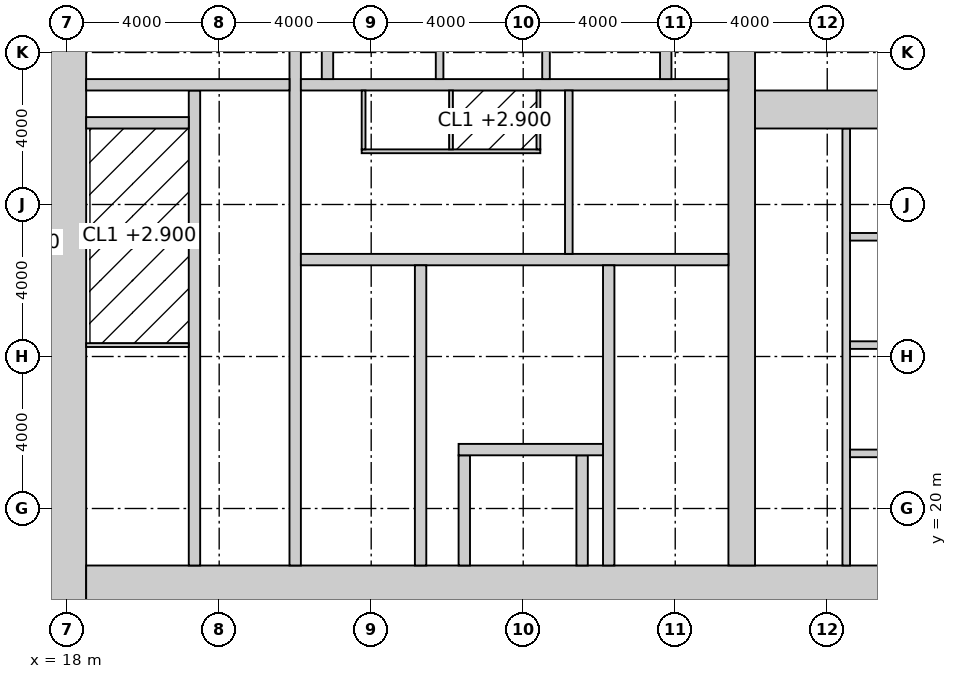
"""IFC4 building model, lengths in metres.
Left out: names, types, materials, properties, quantities, classifications, styles, units other than length and angle.
Written with IfcOpenShell. Run it as: python <this file> out.ifc"""

import sys

from ifc_helpers import new_model, si_unit, direction, frame, frame_2d, origin, place, context, subcontext, project, spatial, rectangle, extrude, element, fill, save


model = new_model("IFC4")
c1 = context("Model", 3, precision=1e-05, world=origin(), true_north=direction((0.0, 1.0)))
c2 = subcontext(c1, "Body", "Model", "MODEL_VIEW")
j1 = project(units=[si_unit("LENGTHUNIT", "METRE"), si_unit("PLANEANGLEUNIT", "RADIAN")], contexts=[c1])
p1 = place(None, origin())
s1 = spatial("IfcSite", under=j1, at=p1, CompositionType="ELEMENT")
p2 = place(p1, origin())
s2 = spatial("IfcBuilding", under=s1, at=p2, CompositionType="ELEMENT")
p3 = place(p2, frame((0.0, 0.0, 27.0)))
s3 = spatial("IfcBuildingStorey", under=s2, at=p3, CompositionType="ELEMENT", Elevation=27.0)
p4 = place(p3, frame((18.0, 17.1, -0.15), z_axis=(0.0, 0.0, 1.0), x_axis=(0.0, 1.0, 0.0)))
e1 = element("IfcWall", 1, at=p4, inside=s3, PredefinedType="SHEAR", context=c2, shape_type="SweptSolid", body=[
    extrude(rectangle(XDim=19.8, YDim=1.0, at=frame_2d((9.9, 0.0))), origin(), (0.0, 0.0, 1.0), 4.0),
])
p5 = place(p3, frame((18.5, 17.8, -0.15), z_axis=(0.0, 0.0, 1.0), x_axis=(1.0, 0.0, 0.0)))
e2 = element("IfcWall", 2, at=p5, inside=s3, PredefinedType="SHEAR", context=c2, shape_type="SweptSolid", body=[
    extrude(rectangle(XDim=23.0, YDim=1.4, at=frame_2d((11.5, 0.0))), origin(), (0.0, 0.0, 1.0), 4.0),
])
p6 = place(p5, frame((3.45, 0.0, 0.15)))
e3 = element("IfcOpeningElement", 3, at=p6, cuts=e2, PredefinedType="OPENING", context=c2, shape_type="SweptSolid", body=[
    extrude(rectangle(XDim=1.5, YDim=2.4, at=frame_2d((0.75, 1.2))), frame((0.0, 0.71, 0.0), z_axis=(0.0, -1.0, 0.0), x_axis=(1.0, 0.0, 0.0)), (0.0, 0.0, 1.0), 1.42),
])
p7 = place(p5, frame((17.9, 0.0, 0.15)))
e4 = element("IfcOpeningElement", 4, at=p7, cuts=e2, PredefinedType="OPENING", context=c2, shape_type="SweptSolid", body=[
    extrude(rectangle(XDim=1.5, YDim=2.4, at=frame_2d((0.75, 1.2))), frame((0.0, 0.71, 0.0), z_axis=(0.0, -1.0, 0.0), x_axis=(1.0, 0.0, 0.0)), (0.0, 0.0, 1.0), 1.42),
])
p8 = place(p5, frame((0.9, 0.0, 0.15)))
e5 = element("IfcOpeningElement", 5, at=p8, cuts=e2, PredefinedType="OPENING", context=c2, shape_type="SweptSolid", body=[
    extrude(rectangle(XDim=1.0, YDim=2.2, at=frame_2d((0.5, 1.1))), frame((0.0, 0.71, 0.0), z_axis=(0.0, -1.0, 0.0), x_axis=(1.0, 0.0, 0.0)), (0.0, 0.0, 1.0), 1.42),
])
p9 = place(p3, frame((35.75, 18.5, -0.15), z_axis=(0.0, 0.0, 1.0), x_axis=(0.0, 1.0, 0.0)))
e6 = element("IfcWall", 6, at=p9, inside=s3, PredefinedType="SHEAR", context=c2, shape_type="SweptSolid", body=[
    extrude(rectangle(XDim=17.0, YDim=0.7, at=frame_2d((8.5, 0.0))), origin(), (0.0, 0.0, 1.0), 4.0),
])
p10 = place(p9, frame((9.85, 0.0, 0.15)))
e7 = element("IfcOpeningElement", 7, at=p10, cuts=e6, PredefinedType="OPENING", context=c2, shape_type="SweptSolid", body=[
    extrude(rectangle(XDim=1.0, YDim=2.2, at=frame_2d((0.5, 1.1))), frame((0.0, 0.36, 0.0), z_axis=(0.0, -1.0, 0.0), x_axis=(1.0, 0.0, 0.0)), (0.0, 0.0, 1.0), 0.72),
])
p11 = place(p3, frame((24.0, 18.5, -0.15), z_axis=(0.0, 0.0, 1.0), x_axis=(0.0, 1.0, 0.0)))
e8 = element("IfcWall", 8, at=p11, inside=s3, PredefinedType="SHEAR", context=c2, shape_type="SweptSolid", body=[
    extrude(rectangle(XDim=17.0, YDim=0.3, at=frame_2d((8.5, 0.0))), origin(), (0.0, 0.0, 1.0), 4.0),
])
p12 = place(p11, frame((9.6, 0.0, 0.15)))
e9 = element("IfcOpeningElement", 9, at=p12, cuts=e8, PredefinedType="OPENING", context=c2, shape_type="SweptSolid", body=[
    extrude(rectangle(XDim=1.5, YDim=2.4, at=frame_2d((0.75, 1.2))), frame((0.0, 0.16, 0.0), z_axis=(0.0, -1.0, 0.0), x_axis=(1.0, 0.0, 0.0)), (0.0, 0.0, 1.0), 0.32),
])
p13 = place(p3, frame((24.15, 26.55, -0.15), z_axis=(0.0, 0.0, 1.0), x_axis=(1.0, 0.0, 0.0)))
e10 = element("IfcWall", 10, at=p13, inside=s3, PredefinedType="SHEAR", context=c2, shape_type="SweptSolid", body=[
    extrude(rectangle(XDim=11.25, YDim=0.3, at=frame_2d((5.625, 0.0))), origin(), (0.0, 0.0, 1.0), 4.0),
])
p14 = place(p13, frame((9.25, 0.0, 0.15)))
e11 = element("IfcOpeningElement", 11, at=p14, cuts=e10, PredefinedType="OPENING", context=c2, shape_type="SweptSolid", body=[
    extrude(rectangle(XDim=1.0, YDim=2.2, at=frame_2d((0.5, 1.1))), frame((0.0, 0.16, 0.0), z_axis=(0.0, -1.0, 0.0), x_axis=(1.0, 0.0, 0.0)), (0.0, 0.0, 1.0), 0.32),
])
p15 = place(p13, frame((4.9, 0.0, 0.15)))
e12 = element("IfcOpeningElement", 12, at=p15, cuts=e10, PredefinedType="OPENING", context=c2, shape_type="SweptSolid", body=[
    extrude(rectangle(XDim=1.5, YDim=2.4, at=frame_2d((0.75, 1.2))), frame((0.0, 0.16, 0.0), z_axis=(0.0, -1.0, 0.0), x_axis=(1.0, 0.0, 0.0)), (0.0, 0.0, 1.0), 0.32),
])
p16 = place(p3, frame((27.3, 18.5, -0.15), z_axis=(0.0, 0.0, 1.0), x_axis=(0.0, 1.0, 0.0)))
e13 = element("IfcWall", 13, at=p16, inside=s3, PredefinedType="SHEAR", context=c2, shape_type="SweptSolid", body=[
    extrude(rectangle(XDim=7.9, YDim=0.3, at=frame_2d((3.95, 0.0))), origin(), (0.0, 0.0, 1.0), 4.0),
])
p17 = place(p16, frame((6.4, 0.0, 0.15)))
e14 = element("IfcOpeningElement", 14, at=p17, cuts=e13, PredefinedType="OPENING", context=c2, shape_type="SweptSolid", body=[
    extrude(rectangle(XDim=1.0, YDim=2.2, at=frame_2d((0.5, 1.1))), frame((0.0, 0.16, 0.0), z_axis=(0.0, -1.0, 0.0), x_axis=(1.0, 0.0, 0.0)), (0.0, 0.0, 1.0), 0.32),
])
p18 = place(p3, frame((32.25, 18.5, -0.15), z_axis=(0.0, 0.0, 1.0), x_axis=(0.0, 1.0, 0.0)))
e15 = element("IfcWall", 15, at=p18, inside=s3, PredefinedType="SHEAR", context=c2, shape_type="SweptSolid", body=[
    extrude(rectangle(XDim=7.9, YDim=0.3, at=frame_2d((3.95, 0.0))), origin(), (0.0, 0.0, 1.0), 4.0),
])
for number, where, z_axis, x_axis in (
    (16, (28.45, 18.5, -0.15), (0.0, 0.0, 1.0), (0.0, 1.0, 0.0)),
    (17, (31.55, 18.5, -0.15), (0.0, 0.0, 1.0), (0.0, 1.0, 0.0)),
):
    element("IfcWall", number, at=place(p3, frame(where, z_axis=z_axis, x_axis=x_axis)), inside=s3, PredefinedType="SHEAR", context=c2, shape_type="SweptSolid", body=[
        extrude(rectangle(XDim=2.9, YDim=0.3, at=frame_2d((1.45, 0.0))), origin(), (0.0, 0.0, 1.0), 4.0),
    ])
p19 = place(p3, frame((28.3, 21.55, -0.15), z_axis=(0.0, 0.0, 1.0), x_axis=(1.0, 0.0, 0.0)))
e18 = element("IfcWall", 18, at=p19, inside=s3, PredefinedType="SHEAR", context=c2, shape_type="SweptSolid", body=[
    extrude(rectangle(XDim=3.8, YDim=0.3, at=frame_2d((1.9, 0.0))), origin(), (0.0, 0.0, 1.0), 4.0),
])
p20 = place(p19, frame((1.05, 0.0, 0.15)))
e19 = element("IfcOpeningElement", 19, at=p20, cuts=e18, PredefinedType="OPENING", context=c2, shape_type="SweptSolid", body=[
    extrude(rectangle(XDim=1.3, YDim=2.4, at=frame_2d((0.65, 1.2))), frame((0.0, 0.16, 0.0), z_axis=(0.0, -1.0, 0.0), x_axis=(1.0, 0.0, 0.0)), (0.0, 0.0, 1.0), 0.32),
])
p21 = place(p3, frame((24.15, 31.15, -0.15), z_axis=(0.0, 0.0, 1.0), x_axis=(1.0, 0.0, 0.0)))
e20 = element("IfcWall", 20, at=p21, inside=s3, PredefinedType="SHEAR", context=c2, shape_type="SweptSolid", body=[
    extrude(rectangle(XDim=11.25, YDim=0.3, at=frame_2d((5.625, 0.0))), origin(), (0.0, 0.0, 1.0), 4.0),
])
p22 = place(p21, frame((7.25, 0.0, 0.15)))
e21 = element("IfcOpeningElement", 21, at=p22, cuts=e20, PredefinedType="OPENING", context=c2, shape_type="SweptSolid", body=[
    extrude(rectangle(XDim=1.4, YDim=2.4, at=frame_2d((0.7, 1.2))), frame((0.0, 0.16, 0.0), z_axis=(0.0, -1.0, 0.0), x_axis=(1.0, 0.0, 0.0)), (0.0, 0.0, 1.0), 0.32),
])
p23 = place(p3, frame((21.35, 18.5, -0.15), z_axis=(0.0, 0.0, 1.0), x_axis=(0.0, 1.0, 0.0)))
e22 = element("IfcWall", 22, at=p23, inside=s3, PredefinedType="SHEAR", context=c2, shape_type="SweptSolid", body=[
    extrude(rectangle(XDim=12.5, YDim=0.3, at=frame_2d((6.25, 0.0))), origin(), (0.0, 0.0, 1.0), 4.0),
])
p24 = place(p23, frame((8.15, 0.0, 0.15)))
e23 = element("IfcOpeningElement", 23, at=p24, cuts=e22, PredefinedType="OPENING", context=c2, shape_type="SweptSolid", body=[
    extrude(rectangle(XDim=1.0, YDim=2.2, at=frame_2d((0.5, 1.1))), frame((0.0, 0.16, 0.0), z_axis=(0.0, -1.0, 0.0), x_axis=(1.0, 0.0, 0.0)), (0.0, 0.0, 1.0), 0.32),
])
p25 = place(p3, frame((18.5, 31.15, -0.15), z_axis=(0.0, 0.0, 1.0), x_axis=(1.0, 0.0, 0.0)))
e24 = element("IfcWall", 24, at=p25, inside=s3, PredefinedType="SHEAR", context=c2, shape_type="SweptSolid", body=[
    extrude(rectangle(XDim=5.35, YDim=0.3, at=frame_2d((2.675, 0.0))), origin(), (0.0, 0.0, 1.0), 4.0),
])
p26 = place(p25, frame((3.4, 0.0, 0.15)))
e25 = element("IfcOpeningElement", 25, at=p26, cuts=e24, PredefinedType="OPENING", context=c2, shape_type="SweptSolid", body=[
    extrude(rectangle(XDim=1.0, YDim=2.2, at=frame_2d((0.5, 1.1))), frame((0.0, 0.16, 0.0), z_axis=(0.0, -1.0, 0.0), x_axis=(1.0, 0.0, 0.0)), (0.0, 0.0, 1.0), 0.32),
])
p27 = place(p3, frame((18.5, 30.15, -0.15), z_axis=(0.0, 0.0, 1.0), x_axis=(1.0, 0.0, 0.0)))
e26 = element("IfcWall", 26, at=p27, inside=s3, PredefinedType="SHEAR", context=c2, shape_type="SweptSolid", body=[
    extrude(rectangle(XDim=2.7, YDim=0.3, at=frame_2d((1.35, 0.0))), origin(), (0.0, 0.0, 1.0), 4.0),
])
for number, where, z_axis, x_axis in (
    (27, (24.85, 31.3, -0.15), (0.0, 0.0, 1.0), (0.0, 1.0, 0.0)),
    (28, (33.75, 31.3, -0.15), (0.0, 0.0, 1.0), (0.0, 1.0, 0.0)),
):
    element("IfcWall", number, at=place(p3, frame(where, z_axis=z_axis, x_axis=x_axis)), inside=s3, PredefinedType="SHEAR", context=c2, shape_type="SweptSolid", body=[
        extrude(rectangle(XDim=4.2, YDim=0.3, at=frame_2d((2.1, 0.0))), origin(), (0.0, 0.0, 1.0), 4.0),
    ])
for number, where, z_axis, x_axis in (
    (29, (27.8, 31.3, -0.15), (0.0, 0.0, 1.0), (0.0, 1.0, 0.0)),
    (30, (30.6, 31.3, -0.15), (0.0, 0.0, 1.0), (0.0, 1.0, 0.0)),
):
    element("IfcWall", number, at=place(p3, frame(where, z_axis=z_axis, x_axis=x_axis)), inside=s3, PredefinedType="SOLIDWALL", context=c2, shape_type="SweptSolid", body=[
        extrude(rectangle(XDim=2.8, YDim=0.2, at=frame_2d((1.4, 0.0))), origin(), (0.0, 0.0, 1.0), 4.0),
    ])
p28 = place(p3, frame((38.5, 18.5, -0.15), z_axis=(0.0, 0.0, 1.0), x_axis=(0.0, 1.0, 0.0)))
e31 = element("IfcWall", 31, at=p28, inside=s3, PredefinedType="SOLIDWALL", context=c2, shape_type="SweptSolid", body=[
    extrude(rectangle(XDim=11.5, YDim=0.2, at=frame_2d((5.75, 0.0))), origin(), (0.0, 0.0, 1.0), 4.0),
])
p29 = place(p28, frame((0.875, 0.0, 0.15)))
e32 = element("IfcOpeningElement", 32, at=p29, cuts=e31, PredefinedType="OPENING", context=c2, shape_type="SweptSolid", body=[
    extrude(rectangle(XDim=1.1, YDim=2.2, at=frame_2d((0.55, 1.1))), frame((0.0, 0.11, 0.0), z_axis=(0.0, -1.0, 0.0), x_axis=(1.0, 0.0, 0.0)), (0.0, 0.0, 1.0), 0.22),
])
p30 = place(p28, frame((3.825, 0.0, 0.15)))
e33 = element("IfcOpeningElement", 33, at=p30, cuts=e31, PredefinedType="OPENING", context=c2, shape_type="SweptSolid", body=[
    extrude(rectangle(XDim=1.1, YDim=2.2, at=frame_2d((0.55, 1.1))), frame((0.0, 0.11, 0.0), z_axis=(0.0, -1.0, 0.0), x_axis=(1.0, 0.0, 0.0)), (0.0, 0.0, 1.0), 0.22),
])
p31 = place(p28, frame((6.675, 0.0, 0.15)))
e34 = element("IfcOpeningElement", 34, at=p31, cuts=e31, PredefinedType="OPENING", context=c2, shape_type="SweptSolid", body=[
    extrude(rectangle(XDim=1.1, YDim=2.2, at=frame_2d((0.55, 1.1))), frame((0.0, 0.11, 0.0), z_axis=(0.0, -1.0, 0.0), x_axis=(1.0, 0.0, 0.0)), (0.0, 0.0, 1.0), 0.22),
])
p32 = place(p28, frame((9.575, 0.0, 0.15)))
e35 = element("IfcOpeningElement", 35, at=p32, cuts=e31, PredefinedType="OPENING", context=c2, shape_type="SweptSolid", body=[
    extrude(rectangle(XDim=1.1, YDim=2.2, at=frame_2d((0.55, 1.1))), frame((0.0, 0.11, 0.0), z_axis=(0.0, -1.0, 0.0), x_axis=(1.0, 0.0, 0.0)), (0.0, 0.0, 1.0), 0.22),
])
p33 = place(p3, frame((36.1, 30.5, -0.15), z_axis=(0.0, 0.0, 1.0), x_axis=(1.0, 0.0, 0.0)))
e36 = element("IfcWall", 36, at=p33, inside=s3, PredefinedType="SHEAR", context=c2, shape_type="SweptSolid", body=[
    extrude(rectangle(XDim=5.4, YDim=1.0, at=frame_2d((2.7, 0.0))), origin(), (0.0, 0.0, 1.0), 4.0),
])
p34 = place(p33, frame((0.6, 0.0, 0.15)))
e37 = element("IfcOpeningElement", 37, at=p34, cuts=e36, PredefinedType="OPENING", context=c2, shape_type="SweptSolid", body=[
    extrude(rectangle(XDim=1.0, YDim=2.2, at=frame_2d((0.5, 1.1))), frame((0.0, 0.51, 0.0), z_axis=(0.0, -1.0, 0.0), x_axis=(1.0, 0.0, 0.0)), (0.0, 0.0, 1.0), 1.02),
])
for number, where, z_axis, x_axis in (
    (38, (38.6, 21.45, -0.15), (0.0, 0.0, 1.0), (1.0, 0.0, 0.0)),
    (39, (38.6, 24.3, -0.15), (0.0, 0.0, 1.0), (1.0, 0.0, 0.0)),
    (40, (38.6, 27.15, -0.15), (0.0, 0.0, 1.0), (1.0, 0.0, 0.0)),
):
    element("IfcWall", number, at=place(p3, frame(where, z_axis=z_axis, x_axis=x_axis)), inside=s3, PredefinedType="SOLIDWALL", context=c2, shape_type="SweptSolid", body=[
        extrude(rectangle(XDim=2.9, YDim=0.2, at=frame_2d((1.45, 0.0))), origin(), (0.0, 0.0, 1.0), 4.0),
    ])
p35 = place(p3, frame((31.2, 26.7, 0.0), z_axis=(0.0, 0.0, 1.0), x_axis=(0.0, 1.0, 0.0)))
e41 = element("IfcWall", 41, at=p35, inside=s3, PredefinedType="SOLIDWALL", context=c2, shape_type="SweptSolid", body=[
    extrude(rectangle(XDim=4.3, YDim=0.2, at=frame_2d((2.15, 0.0))), origin(), (0.0, 0.0, 1.0), 3.85),
])
p36 = place(p3, frame((25.75, 29.4, 0.0), z_axis=(0.0, 0.0, 1.0), x_axis=(1.0, 0.0, 0.0)))
e42 = element("IfcWall", 42, at=p36, inside=s3, PredefinedType="PARTITIONING", context=c2, shape_type="SweptSolid", body=[
    extrude(rectangle(XDim=4.7, YDim=0.1, at=frame_2d((2.35, 0.0))), origin(), (0.0, 0.0, 1.0), 3.85),
])
p37 = place(p36, frame((0.7, 0.0, 0.0)))
e43 = element("IfcOpeningElement", 43, at=p37, cuts=e42, PredefinedType="OPENING", context=c2, shape_type="SweptSolid", body=[
    extrude(rectangle(XDim=1.0, YDim=2.2, at=frame_2d((0.5, 1.1))), frame((0.0, 0.06, 0.0), z_axis=(0.0, -1.0, 0.0), x_axis=(1.0, 0.0, 0.0)), (0.0, 0.0, 1.0), 0.12),
])
p38 = place(p36, frame((3.0, 0.0, 0.0)))
e44 = element("IfcOpeningElement", 44, at=p38, cuts=e42, PredefinedType="OPENING", context=c2, shape_type="SweptSolid", body=[
    extrude(rectangle(XDim=1.0, YDim=2.2, at=frame_2d((0.5, 1.1))), frame((0.0, 0.06, 0.0), z_axis=(0.0, -1.0, 0.0), x_axis=(1.0, 0.0, 0.0)), (0.0, 0.0, 1.0), 0.12),
])
for number, where, z_axis, x_axis in (
    (45, (25.8, 29.45, 0.0), (0.0, 0.0, 1.0), (0.0, 1.0, 0.0)),
    (46, (30.4, 29.45, 0.0), (0.0, 0.0, 1.0), (0.0, 1.0, 0.0)),
    (47, (28.1, 29.45, 0.0), (0.0, 0.0, 1.0), (0.0, 1.0, 0.0)),
):
    element("IfcWall", number, at=place(p3, frame(where, z_axis=z_axis, x_axis=x_axis)), inside=s3, PredefinedType="PARTITIONING", context=c2, shape_type="SweptSolid", body=[
        extrude(rectangle(XDim=1.55, YDim=0.1, at=frame_2d((0.775, 0.0))), origin(), (0.0, 0.0, 1.0), 3.85),
    ])
p39 = place(p3, frame((18.5, 24.3, 0.0), z_axis=(0.0, 0.0, 1.0), x_axis=(1.0, 0.0, 0.0)))
e48 = element("IfcWall", 48, at=p39, inside=s3, PredefinedType="PARTITIONING", context=c2, shape_type="SweptSolid", body=[
    extrude(rectangle(XDim=2.7, YDim=0.1, at=frame_2d((1.35, 0.0))), origin(), (0.0, 0.0, 1.0), 3.85),
])
p40 = place(p17, origin())
e49 = element("IfcDoor", 49, at=p40, inside=s3, OperationType="SINGLE_SWING_RIGHT", PredefinedType="DOOR", context=c2, shape_type="SweptSolid", body=[
    extrude(rectangle(XDim=1.0, YDim=2.2, at=frame_2d((0.5, 1.1))), frame((0.0, 0.025, 0.0), z_axis=(0.0, -1.0, 0.0), x_axis=(1.0, 0.0, 0.0)), (0.0, 0.0, 1.0), 0.05),
])
fill(e14, e49)
p41 = place(p14, frame((1.0, 0.0, 0.0), z_axis=(0.0, 0.0, 1.0), x_axis=(-1.0, 0.0, 0.0)))
e50 = element("IfcDoor", 50, at=p41, inside=s3, OperationType="SINGLE_SWING_RIGHT", PredefinedType="DOOR", context=c2, shape_type="SweptSolid", body=[
    extrude(rectangle(XDim=1.0, YDim=2.2, at=frame_2d((0.5, 1.1))), frame((0.0, 0.025, 0.0), z_axis=(0.0, -1.0, 0.0), x_axis=(1.0, 0.0, 0.0)), (0.0, 0.0, 1.0), 0.05),
])
fill(e11, e50)
p42 = place(p10, origin())
e51 = element("IfcDoor", 51, at=p42, inside=s3, OperationType="SINGLE_SWING_RIGHT", PredefinedType="DOOR", context=c2, shape_type="SweptSolid", body=[
    extrude(rectangle(XDim=1.0, YDim=2.2, at=frame_2d((0.5, 1.1))), frame((0.0, 0.025, 0.0), z_axis=(0.0, -1.0, 0.0), x_axis=(1.0, 0.0, 0.0)), (0.0, 0.0, 1.0), 0.05),
])
fill(e7, e51)
p43 = place(p15, origin())
e52 = element("IfcDoor", 52, at=p43, inside=s3, OperationType="DOUBLE_DOOR_DOUBLE_SWING", PredefinedType="DOOR", context=c2, shape_type="SweptSolid", body=[
    extrude(rectangle(XDim=1.5, YDim=2.4, at=frame_2d((0.75, 1.2))), frame((0.0, 0.025, 0.0), z_axis=(0.0, -1.0, 0.0), x_axis=(1.0, 0.0, 0.0)), (0.0, 0.0, 1.0), 0.05),
])
fill(e12, e52)
p44 = place(p12, origin())
e53 = element("IfcDoor", 53, at=p44, inside=s3, OperationType="DOUBLE_DOOR_DOUBLE_SWING", PredefinedType="DOOR", context=c2, shape_type="SweptSolid", body=[
    extrude(rectangle(XDim=1.5, YDim=2.4, at=frame_2d((0.75, 1.2))), frame((0.0, 0.025, 0.0), z_axis=(0.0, -1.0, 0.0), x_axis=(1.0, 0.0, 0.0)), (0.0, 0.0, 1.0), 0.05),
])
fill(e9, e53)
p45 = place(p26, origin())
e54 = element("IfcDoor", 54, at=p45, inside=s3, OperationType="SINGLE_SWING_LEFT", PredefinedType="DOOR", context=c2, shape_type="SweptSolid", body=[
    extrude(rectangle(XDim=1.0, YDim=2.2, at=frame_2d((0.5, 1.1))), frame((0.0, 0.025, 0.0), z_axis=(0.0, -1.0, 0.0), x_axis=(1.0, 0.0, 0.0)), (0.0, 0.0, 1.0), 0.05),
])
fill(e25, e54)
p46 = place(p37, origin())
e55 = element("IfcDoor", 55, at=p46, inside=s3, OperationType="SINGLE_SWING_LEFT", PredefinedType="DOOR", context=c2, shape_type="SweptSolid", body=[
    extrude(rectangle(XDim=1.0, YDim=2.2, at=frame_2d((0.5, 1.1))), frame((0.0, 0.025, 0.0), z_axis=(0.0, -1.0, 0.0), x_axis=(1.0, 0.0, 0.0)), (0.0, 0.0, 1.0), 0.05),
])
fill(e43, e55)
p47 = place(p38, origin())
e56 = element("IfcDoor", 56, at=p47, inside=s3, OperationType="SINGLE_SWING_LEFT", PredefinedType="DOOR", context=c2, shape_type="SweptSolid", body=[
    extrude(rectangle(XDim=1.0, YDim=2.2, at=frame_2d((0.5, 1.1))), frame((0.0, 0.025, 0.0), z_axis=(0.0, -1.0, 0.0), x_axis=(1.0, 0.0, 0.0)), (0.0, 0.0, 1.0), 0.05),
])
fill(e44, e56)
p48 = place(p24, origin())
e57 = element("IfcDoor", 57, at=p48, inside=s3, OperationType="SINGLE_SWING_LEFT", PredefinedType="DOOR", context=c2, shape_type="SweptSolid", body=[
    extrude(rectangle(XDim=1.0, YDim=2.2, at=frame_2d((0.5, 1.1))), frame((0.0, 0.025, 0.0), z_axis=(0.0, -1.0, 0.0), x_axis=(1.0, 0.0, 0.0)), (0.0, 0.0, 1.0), 0.05),
])
fill(e23, e57)
p49 = place(p6, origin())
e58 = element("IfcDoor", 58, at=p49, inside=s3, OperationType="DOUBLE_DOOR_DOUBLE_SWING", PredefinedType="DOOR", context=c2, shape_type="SweptSolid", body=[
    extrude(rectangle(XDim=1.5, YDim=2.4, at=frame_2d((0.75, 1.2))), frame((0.0, 0.025, 0.0), z_axis=(0.0, -1.0, 0.0), x_axis=(1.0, 0.0, 0.0)), (0.0, 0.0, 1.0), 0.05),
])
fill(e3, e58)
p50 = place(p7, origin())
e59 = element("IfcDoor", 59, at=p50, inside=s3, OperationType="DOUBLE_DOOR_DOUBLE_SWING", PredefinedType="DOOR", context=c2, shape_type="SweptSolid", body=[
    extrude(rectangle(XDim=1.5, YDim=2.4, at=frame_2d((0.75, 1.2))), frame((0.0, 0.025, 0.0), z_axis=(0.0, -1.0, 0.0), x_axis=(1.0, 0.0, 0.0)), (0.0, 0.0, 1.0), 0.05),
])
fill(e4, e59)
p51 = place(p34, origin())
e60 = element("IfcDoor", 60, at=p51, inside=s3, OperationType="SINGLE_SWING_LEFT", PredefinedType="DOOR", context=c2, shape_type="SweptSolid", body=[
    extrude(rectangle(XDim=1.0, YDim=2.2, at=frame_2d((0.5, 1.1))), frame((0.0, 0.025, 0.0), z_axis=(0.0, -1.0, 0.0), x_axis=(1.0, 0.0, 0.0)), (0.0, 0.0, 1.0), 0.05),
])
fill(e37, e60)
p52 = place(p8, origin())
e61 = element("IfcDoor", 61, at=p52, inside=s3, OperationType="SINGLE_SWING_LEFT", PredefinedType="DOOR", context=c2, shape_type="SweptSolid", body=[
    extrude(rectangle(XDim=1.0, YDim=2.2, at=frame_2d((0.5, 1.1))), frame((0.0, 0.025, 0.0), z_axis=(0.0, -1.0, 0.0), x_axis=(1.0, 0.0, 0.0)), (0.0, 0.0, 1.0), 0.05),
])
fill(e5, e61)
p53 = place(p20, origin())
e62 = element("IfcDoor", 62, at=p53, inside=s3, OperationType="DOUBLE_DOOR_SLIDING", PredefinedType="DOOR", context=c2, shape_type="SweptSolid", body=[
    extrude(rectangle(XDim=1.3, YDim=2.4, at=frame_2d((0.65, 1.2))), frame((0.0, 0.025, 0.0), z_axis=(0.0, -1.0, 0.0), x_axis=(1.0, 0.0, 0.0)), (0.0, 0.0, 1.0), 0.05),
])
fill(e19, e62)
p54 = place(p22, origin())
e63 = element("IfcDoor", 63, at=p54, inside=s3, OperationType="DOUBLE_DOOR_SLIDING", PredefinedType="DOOR", context=c2, shape_type="SweptSolid", body=[
    extrude(rectangle(XDim=1.4, YDim=2.4, at=frame_2d((0.7, 1.2))), frame((0.0, 0.025, 0.0), z_axis=(0.0, -1.0, 0.0), x_axis=(1.0, 0.0, 0.0)), (0.0, 0.0, 1.0), 0.05),
])
fill(e21, e63)
p55 = place(p29, origin())
e64 = element("IfcDoor", 64, at=p55, inside=s3, OperationType="DOUBLE_DOOR_SLIDING", PredefinedType="DOOR", context=c2, shape_type="SweptSolid", body=[
    extrude(rectangle(XDim=1.1, YDim=2.2, at=frame_2d((0.55, 1.1))), frame((0.0, 0.025, 0.0), z_axis=(0.0, -1.0, 0.0), x_axis=(1.0, 0.0, 0.0)), (0.0, 0.0, 1.0), 0.05),
])
fill(e32, e64)
p56 = place(p30, origin())
e65 = element("IfcDoor", 65, at=p56, inside=s3, OperationType="DOUBLE_DOOR_SLIDING", PredefinedType="DOOR", context=c2, shape_type="SweptSolid", body=[
    extrude(rectangle(XDim=1.1, YDim=2.2, at=frame_2d((0.55, 1.1))), frame((0.0, 0.025, 0.0), z_axis=(0.0, -1.0, 0.0), x_axis=(1.0, 0.0, 0.0)), (0.0, 0.0, 1.0), 0.05),
])
fill(e33, e65)
p57 = place(p31, origin())
e66 = element("IfcDoor", 66, at=p57, inside=s3, OperationType="DOUBLE_DOOR_SLIDING", PredefinedType="DOOR", context=c2, shape_type="SweptSolid", body=[
    extrude(rectangle(XDim=1.1, YDim=2.2, at=frame_2d((0.55, 1.1))), frame((0.0, 0.025, 0.0), z_axis=(0.0, -1.0, 0.0), x_axis=(1.0, 0.0, 0.0)), (0.0, 0.0, 1.0), 0.05),
])
fill(e34, e66)
p58 = place(p32, origin())
e67 = element("IfcDoor", 67, at=p58, inside=s3, OperationType="DOUBLE_DOOR_SLIDING", PredefinedType="DOOR", context=c2, shape_type="SweptSolid", body=[
    extrude(rectangle(XDim=1.1, YDim=2.2, at=frame_2d((0.55, 1.1))), frame((0.0, 0.025, 0.0), z_axis=(0.0, -1.0, 0.0), x_axis=(1.0, 0.0, 0.0)), (0.0, 0.0, 1.0), 0.05),
])
fill(e35, e67)
save(model, sys.argv[1])
